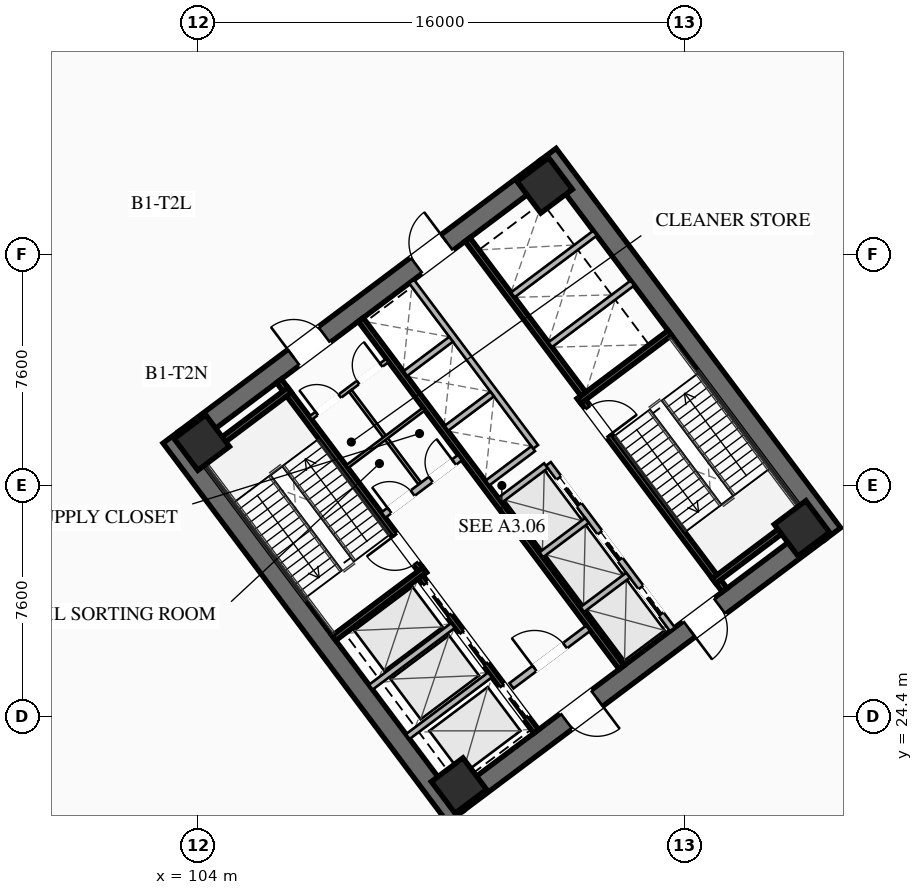
"""IFC4 building model, lengths in metres.
Left out: names, types, materials, properties, quantities, classifications, styles, units other than length and angle.
Written with IfcOpenShell. Run it as: python <this file> out.ifc"""

import sys

from ifc_helpers import new_model, si_unit, direction, frame, frame_2d, origin, origin_2d, place, context, subcontext, project, spatial, rectangle, hollow_rectangle, extrude, element, fill, save


model = new_model("IFC4")
c1 = context("Model", 3, precision=1e-05, world=origin(), true_north=direction((0.0, 1.0)))
c2 = subcontext(c1, "Body", "Model", "MODEL_VIEW")
j1 = project(units=[si_unit("LENGTHUNIT", "METRE"), si_unit("PLANEANGLEUNIT", "RADIAN")], contexts=[c1])
p1 = place(None, origin())
s1 = spatial("IfcSite", under=j1, at=p1, CompositionType="ELEMENT")
p2 = place(p1, origin())
s2 = spatial("IfcBuilding", under=s1, at=p2, CompositionType="ELEMENT")
p3 = place(p2, frame((0.0, 0.0, -5.5)))
s3 = spatial("IfcBuildingStorey", under=s2, at=p3, CompositionType="ELEMENT", Elevation=-5.5)
for number, where, z_axis, x_axis in (
    (1, (112.476, 21.107, 0.0), (0.0, 0.0, 1.0), (-0.6, 0.8, 0.0)),
    (2, (115.524, 42.893, 0.0), (0.0, 0.0, 1.0), (0.6, -0.8, 0.0)),
):
    element("IfcWall", number, at=place(p3, frame(where, z_axis=z_axis, x_axis=x_axis)), inside=s3, PredefinedType="SHEAR", context=c2, shape_type="SweptSolid", body=[
        extrude(rectangle(XDim=15.6, YDim=0.65, at=frame_2d((7.8, 0.0))), origin(), (0.0, 0.0, 1.0), 5.5),
    ])
p4 = place(p3, frame((124.429, 30.478, 0.0), z_axis=(0.0, 0.0, 1.0), x_axis=(-0.799998028465, -0.600002628705, 0.0)))
e3 = element("IfcWall", 3, at=p4, inside=s3, PredefinedType="SHEAR", context=c2, shape_type="SweptSolid", body=[
    extrude(rectangle(XDim=14.86, YDim=0.65, at=frame_2d((7.43, 0.0))), origin(), (0.0, 0.0, 1.0), 5.5),
])
p5 = place(p4, frame((9.13, 0.0, 0.0)))
e4 = element("IfcOpeningElement", 4, at=p5, cuts=e3, PredefinedType="OPENING", context=c2, shape_type="SweptSolid", body=[
    extrude(rectangle(XDim=1.25, YDim=2.25, at=frame_2d((0.625, 1.125))), frame((0.0, 0.335, 0.0), z_axis=(0.0, -1.0, 0.0), x_axis=(1.0, 0.0, 0.0)), (0.0, 0.0, 1.0), 0.67),
])
p6 = place(p4, frame((4.08, 0.0, 0.0)))
e5 = element("IfcOpeningElement", 5, at=p6, cuts=e3, PredefinedType="OPENING", context=c2, shape_type="SweptSolid", body=[
    extrude(rectangle(XDim=1.25, YDim=2.25, at=frame_2d((0.625, 1.125))), frame((0.0, 0.335, 0.0), z_axis=(0.0, -1.0, 0.0), x_axis=(1.0, 0.0, 0.0)), (0.0, 0.0, 1.0), 0.67),
])
p7 = place(p3, frame((103.571, 33.522, 0.0), z_axis=(0.0, 0.0, 1.0), x_axis=(0.799998028465, 0.600002628705, 0.0)))
e6 = element("IfcWall", 6, at=p7, inside=s3, PredefinedType="SHEAR", context=c2, shape_type="SweptSolid", body=[
    extrude(rectangle(XDim=14.86, YDim=0.65, at=frame_2d((7.43, 0.0))), origin(), (0.0, 0.0, 1.0), 5.5),
])
p8 = place(p7, frame((4.48, 0.0, 0.0)))
e7 = element("IfcOpeningElement", 7, at=p8, cuts=e6, PredefinedType="OPENING", context=c2, shape_type="SweptSolid", body=[
    extrude(rectangle(XDim=1.25, YDim=2.25, at=frame_2d((0.625, 1.125))), frame((0.0, 0.335, 0.0), z_axis=(0.0, -1.0, 0.0), x_axis=(1.0, 0.0, 0.0)), (0.0, 0.0, 1.0), 0.67),
])
p9 = place(p7, frame((9.53, 0.0, 0.0)))
e8 = element("IfcOpeningElement", 8, at=p9, cuts=e6, PredefinedType="OPENING", context=c2, shape_type="SweptSolid", body=[
    extrude(rectangle(XDim=1.25, YDim=2.25, at=frame_2d((0.625, 1.125))), frame((0.0, 0.335, 0.0), z_axis=(0.0, -1.0, 0.0), x_axis=(1.0, 0.0, 0.0)), (0.0, 0.0, 1.0), 0.67),
])
for number, where, z_axis, x_axis in (
    (9, (112.59, 22.13, 0.0), (0.0, 0.0, 1.0), (0.8, 0.6, 0.0)),
    (10, (123.87, 30.59, 0.0), (0.0, 0.0, 1.0), (0.8, 0.6, 0.0)),
    (11, (115.41, 41.87, 0.0), (0.0, 0.0, 1.0), (0.8, 0.6, 0.0)),
    (12, (104.13, 33.41, 0.0), (0.0, 0.0, 1.0), (0.8, 0.6, 0.0)),
):
    element("IfcColumn", number, at=place(p3, frame(where, z_axis=z_axis, x_axis=x_axis)), inside=s3, PredefinedType="COLUMN", context=c2, shape_type="SweptSolid", body=[
        extrude(hollow_rectangle(XDim=1.3, YDim=1.3, WallThickness=0.05, at=origin_2d()), origin(), (0.0, 0.0, 1.0), 5.2),
    ])
p10 = place(p3, frame((111.44, 29.08, 0.0), z_axis=(0.0, 0.0, 1.0), x_axis=(-0.600009827119, 0.799992629566, 0.0)))
e13 = element("IfcWall", 13, at=p10, inside=s3, PredefinedType="SHEAR", context=c2, shape_type="SweptSolid", body=[
    extrude(rectangle(XDim=7.95, YDim=0.2, at=frame_2d((3.975, 0.0))), origin(), (0.0, 0.0, 1.0), 5.2),
])
p11 = place(p10, frame((0.45, 0.0, 0.0)))
e14 = element("IfcOpeningElement", 14, at=p11, cuts=e13, PredefinedType="OPENING", context=c2, shape_type="SweptSolid", body=[
    extrude(rectangle(XDim=1.15, YDim=2.2, at=frame_2d((0.575, 1.1))), frame((0.0, 0.11, 0.0), z_axis=(0.0, -1.0, 0.0), x_axis=(1.0, 0.0, 0.0)), (0.0, 0.0, 1.0), 0.22),
])
for number, where, z_axis, x_axis in (
    (15, (108.476, 26.982, 0.0), (0.0, 0.0, 1.0), (0.8, 0.6, 0.0)),
    (16, (104.036, 32.902, 0.0), (0.0, 0.0, 1.0), (0.8, 0.6, 0.0)),
):
    element("IfcWall", number, at=place(p3, frame(where, z_axis=z_axis, x_axis=x_axis)), inside=s3, PredefinedType="SHEAR", context=c2, shape_type="SweptSolid", body=[
        extrude(rectangle(XDim=3.73, YDim=0.2, at=frame_2d((1.865, 0.0))), origin(), (0.0, 0.0, 1.0), 5.2),
    ])
p12 = place(p3, frame((116.56, 34.92, 0.0), z_axis=(0.0, 0.0, 1.0), x_axis=(0.600009827119, -0.799992629566, 0.0)))
e17 = element("IfcWall", 17, at=p12, inside=s3, PredefinedType="SHEAR", context=c2, shape_type="SweptSolid", body=[
    extrude(rectangle(XDim=7.95, YDim=0.2, at=frame_2d((3.975, 0.0))), origin(), (0.0, 0.0, 1.0), 5.2),
])
p13 = place(p12, frame((0.45, 0.0, 0.0)))
e18 = element("IfcOpeningElement", 18, at=p13, cuts=e17, PredefinedType="OPENING", context=c2, shape_type="SweptSolid", body=[
    extrude(rectangle(XDim=1.15, YDim=2.2, at=frame_2d((0.575, 1.1))), frame((0.0, 0.11, 0.0), z_axis=(0.0, -1.0, 0.0), x_axis=(1.0, 0.0, 0.0)), (0.0, 0.0, 1.0), 0.22),
])
for number, where, z_axis, x_axis in (
    (19, (116.54, 34.78, 0.0), (0.0, 0.0, 1.0), (0.8, 0.6, 0.0)),
    (20, (120.98, 28.86, 0.0), (0.0, 0.0, 1.0), (0.8, 0.6, 0.0)),
):
    element("IfcWall", number, at=place(p3, frame(where, z_axis=z_axis, x_axis=x_axis)), inside=s3, PredefinedType="SHEAR", context=c2, shape_type="SweptSolid", body=[
        extrude(rectangle(XDim=3.73, YDim=0.2, at=frame_2d((1.865, 0.0))), origin(), (0.0, 0.0, 1.0), 5.2),
    ])
p14 = place(p3, frame((117.938, 26.016, 0.0), z_axis=(0.0, 0.0, 1.0), x_axis=(-0.600005463273, 0.799995902516, 0.0)))
e21 = element("IfcWall", 21, at=p14, inside=s3, PredefinedType="SHEAR", context=c2, shape_type="SweptSolid", body=[
    extrude(rectangle(XDim=14.3, YDim=0.2, at=frame_2d((7.15, 0.0))), origin(), (0.0, 0.0, 1.0), 5.2),
])
p15 = place(p3, frame((110.104, 31.028, 0.0), z_axis=(0.0, 0.0, 1.0), x_axis=(0.800018601094, 0.59997519774, 0.0)))
e22 = element("IfcWall", 22, at=p15, inside=s3, PredefinedType="SOLIDWALL", context=c2, shape_type="SweptSolid", body=[
    extrude(rectangle(XDim=3.15, YDim=0.22, at=frame_2d((1.575, 0.0))), origin(), (0.0, 0.0, 1.0), 4.243),
])
p16 = place(p15, frame((0.25, 0.0, 0.0)))
e23 = element("IfcOpeningElement", 23, at=p16, cuts=e22, PredefinedType="OPENING", context=c2, shape_type="SweptSolid", body=[
    extrude(rectangle(XDim=0.95, YDim=2.05, at=frame_2d((0.475, 1.025))), frame((0.0, 0.12, 0.0), z_axis=(0.0, -1.0, 0.0), x_axis=(1.0, 0.0, 0.0)), (0.0, 0.0, 1.0), 0.24),
])
p17 = place(p15, frame((1.95, 0.0, 0.0)))
e24 = element("IfcOpeningElement", 24, at=p17, cuts=e22, PredefinedType="OPENING", context=c2, shape_type="SweptSolid", body=[
    extrude(rectangle(XDim=0.95, YDim=2.05, at=frame_2d((0.475, 1.025))), frame((0.0, 0.12, 0.0), z_axis=(0.0, -1.0, 0.0), x_axis=(1.0, 0.0, 0.0)), (0.0, 0.0, 1.0), 0.24),
])
p18 = place(p3, frame((114.316, 25.412, 0.0), z_axis=(0.0, 0.0, 1.0), x_axis=(0.800018601094, 0.59997519774, 0.0)))
e25 = element("IfcWall", 25, at=p18, inside=s3, PredefinedType="SOLIDWALL", context=c2, shape_type="SweptSolid", body=[
    extrude(rectangle(XDim=3.15, YDim=0.22, at=frame_2d((1.575, 0.0))), origin(), (0.0, 0.0, 1.0), 4.243),
])
p19 = place(p18, frame((0.95, 0.0, 0.0)))
e26 = element("IfcOpeningElement", 26, at=p19, cuts=e25, PredefinedType="OPENING", context=c2, shape_type="SweptSolid", body=[
    extrude(rectangle(XDim=1.25, YDim=2.25, at=frame_2d((0.625, 1.125))), frame((0.0, 0.12, 0.0), z_axis=(0.0, -1.0, 0.0), x_axis=(1.0, 0.0, 0.0)), (0.0, 0.0, 1.0), 0.24),
])
p20 = place(p3, frame((115.13, 23.91, 0.0), z_axis=(0.0, 0.0, 1.0), x_axis=(-0.599975393228, 0.800018454488, 0.0)))
e27 = element("IfcWall", 27, at=p20, inside=s3, PredefinedType="SHEAR", context=c2, shape_type="SweptSolid", body=[
    extrude(rectangle(XDim=6.35, YDim=0.2, at=frame_2d((3.175, 0.0))), origin(), (0.0, 0.0, 1.0), 5.2),
])
p21 = place(p20, frame((4.775, 0.0, 0.0)))
e28 = element("IfcOpeningElement", 28, at=p21, cuts=e27, PredefinedType="OPENING", context=c2, shape_type="SweptSolid", body=[
    extrude(rectangle(XDim=1.3, YDim=2.25, at=frame_2d((0.65, 1.125))), frame((0.0, 0.11, 0.0), z_axis=(0.0, -1.0, 0.0), x_axis=(1.0, 0.0, 0.0)), (0.0, 0.0, 1.0), 0.22),
])
p22 = place(p20, frame((2.775, 0.0, 0.0)))
e29 = element("IfcOpeningElement", 29, at=p22, cuts=e27, PredefinedType="OPENING", context=c2, shape_type="SweptSolid", body=[
    extrude(rectangle(XDim=1.3, YDim=2.25, at=frame_2d((0.65, 1.125))), frame((0.0, 0.11, 0.0), z_axis=(0.0, -1.0, 0.0), x_axis=(1.0, 0.0, 0.0)), (0.0, 0.0, 1.0), 0.22),
])
p23 = place(p20, frame((0.575, 0.0, 0.0)))
e30 = element("IfcOpeningElement", 30, at=p23, cuts=e27, PredefinedType="OPENING", context=c2, shape_type="SweptSolid", body=[
    extrude(rectangle(XDim=1.3, YDim=2.25, at=frame_2d((0.65, 1.125))), frame((0.0, 0.11, 0.0), z_axis=(0.0, -1.0, 0.0), x_axis=(1.0, 0.0, 0.0)), (0.0, 0.0, 1.0), 0.22),
])
for number, where, z_axis, x_axis in (
    (31, (110.906, 23.742, 0.0), (0.0, 0.0, 1.0), (0.8, 0.6, 0.0)),
    (32, (109.688, 25.366, 0.0), (0.0, 0.0, 1.0), (0.8, 0.6, 0.0)),
):
    element("IfcWall", number, at=place(p3, frame(where, z_axis=z_axis, x_axis=x_axis)), inside=s3, PredefinedType="SOLIDWALL", context=c2, shape_type="SweptSolid", body=[
        extrude(rectangle(XDim=3.38, YDim=0.2, at=frame_2d((1.69, 0.0))), origin(), (0.0, 0.0, 1.0), 5.2),
    ])
p24 = place(p3, frame((112.87, 40.09, 0.0), z_axis=(0.0, 0.0, 1.0), x_axis=(0.599975393228, -0.800018454488, 0.0)))
e33 = element("IfcWall", 33, at=p24, inside=s3, PredefinedType="SHEAR", context=c2, shape_type="SweptSolid", body=[
    extrude(rectangle(XDim=6.35, YDim=0.2, at=frame_2d((3.175, 0.0))), origin(), (0.0, 0.0, 1.0), 5.2),
])
for number, where, z_axis, x_axis in (
    (34, (115.59, 36.63, 0.0), (0.0, 0.0, 1.0), (0.8, 0.6, 0.0)),
    (35, (114.36, 38.27, 0.0), (0.0, 0.0, 1.0), (0.8, 0.6, 0.0)),
):
    element("IfcWall", number, at=place(p3, frame(where, z_axis=z_axis, x_axis=x_axis)), inside=s3, PredefinedType="SOLIDWALL", context=c2, shape_type="SweptSolid", body=[
        extrude(rectangle(XDim=3.38, YDim=0.2, at=frame_2d((1.69, 0.0))), origin(), (0.0, 0.0, 1.0), 5.2),
    ])
p25 = place(p3, frame((107.71, 34.22, 0.0), z_axis=(0.0, 0.0, 1.0), x_axis=(0.799981399002, 0.60002480053, 0.0)))
e36 = element("IfcWall", 36, at=p25, inside=s3, PredefinedType="PARTITIONING", context=c2, shape_type="SweptSolid", body=[
    extrude(rectangle(XDim=3.15, YDim=0.135, at=frame_2d((1.575, 0.0))), origin(), (0.0, 0.0, 1.0), 4.243),
])
p26 = place(p25, frame((0.25, 0.0, 0.0)))
e37 = element("IfcOpeningElement", 37, at=p26, cuts=e36, PredefinedType="OPENING", context=c2, shape_type="SweptSolid", body=[
    extrude(rectangle(XDim=0.95, YDim=2.05, at=frame_2d((0.475, 1.025))), frame((0.0, 0.077, 0.0), z_axis=(0.0, -1.0, 0.0), x_axis=(1.0, 0.0, 0.0)), (0.0, 0.0, 1.0), 0.155),
])
p27 = place(p25, frame((1.95, 0.0, 0.0)))
e38 = element("IfcOpeningElement", 38, at=p27, cuts=e36, PredefinedType="OPENING", context=c2, shape_type="SweptSolid", body=[
    extrude(rectangle(XDim=0.95, YDim=2.05, at=frame_2d((0.475, 1.025))), frame((0.0, 0.077, 0.0), z_axis=(0.0, -1.0, 0.0), x_axis=(1.0, 0.0, 0.0)), (0.0, 0.0, 1.0), 0.155),
])
p28 = place(p3, frame((111.296, 32.072, 0.0), z_axis=(0.0, 0.0, 1.0), x_axis=(-0.59995887973, 0.800030838552, 0.0)))
e39 = element("IfcWall", 39, at=p28, inside=s3, PredefinedType="PARTITIONING", context=c2, shape_type="SweptSolid", body=[
    extrude(rectangle(XDim=3.8, YDim=0.11, at=frame_2d((1.9, 0.0))), origin(), (0.0, 0.0, 1.0), 4.243),
])
p29 = place(p3, frame((108.91, 32.62, 0.0), z_axis=(0.0, 0.0, 1.0), x_axis=(0.800018601094, 0.59997519774, 0.0)))
e40 = element("IfcWall", 40, at=p29, inside=s3, PredefinedType="PARTITIONING", context=c2, shape_type="SweptSolid", body=[
    extrude(rectangle(XDim=3.15, YDim=0.11, at=frame_2d((1.575, 0.0))), origin(), (0.0, 0.0, 1.0), 4.243),
])
p30 = place(p3, frame((119.61, 27.27, 0.0), z_axis=(0.0, 0.0, 1.0), x_axis=(-0.600011488909, 0.79999138319, 0.0)))
e41 = element("IfcWall", 41, at=p30, inside=s3, PredefinedType="SOLIDWALL", context=c2, shape_type="SweptSolid", body=[
    extrude(rectangle(XDim=6.8, YDim=0.2, at=frame_2d((3.4, 0.0))), origin(), (0.0, 0.0, 1.0), 5.2),
])
p31 = place(p30, frame((0.625, 0.0, 0.0)))
e42 = element("IfcOpeningElement", 42, at=p31, cuts=e41, PredefinedType="OPENING", context=c2, shape_type="SweptSolid", body=[
    extrude(rectangle(XDim=1.1, YDim=2.2, at=frame_2d((0.55, 1.1))), frame((0.0, 0.11, 0.0), z_axis=(0.0, -1.0, 0.0), x_axis=(1.0, 0.0, 0.0)), (0.0, 0.0, 1.0), 0.22),
])
p32 = place(p30, frame((2.875, 0.0, 0.0)))
e43 = element("IfcOpeningElement", 43, at=p32, cuts=e41, PredefinedType="OPENING", context=c2, shape_type="SweptSolid", body=[
    extrude(rectangle(XDim=1.1, YDim=2.2, at=frame_2d((0.55, 1.1))), frame((0.0, 0.11, 0.0), z_axis=(0.0, -1.0, 0.0), x_axis=(1.0, 0.0, 0.0)), (0.0, 0.0, 1.0), 0.22),
])
p33 = place(p30, frame((5.125, 0.0, 0.0)))
e44 = element("IfcOpeningElement", 44, at=p33, cuts=e41, PredefinedType="OPENING", context=c2, shape_type="SweptSolid", body=[
    extrude(rectangle(XDim=1.1, YDim=2.2, at=frame_2d((0.55, 1.1))), frame((0.0, 0.11, 0.0), z_axis=(0.0, -1.0, 0.0), x_axis=(1.0, 0.0, 0.0)), (0.0, 0.0, 1.0), 0.22),
])
p34 = place(p3, frame((116.646, 27.922, 0.0), z_axis=(0.0, 0.0, 1.0), x_axis=(0.8, 0.6, 0.0)))
e45 = element("IfcWall", 45, at=p34, inside=s3, PredefinedType="SOLIDWALL", context=c2, shape_type="SweptSolid", body=[
    extrude(rectangle(XDim=1.88, YDim=0.2, at=frame_2d((0.94, 0.0))), origin(), (0.0, 0.0, 1.0), 5.2),
])
p35 = place(p3, frame((115.296, 29.722, 0.0), z_axis=(0.0, 0.0, 1.0), x_axis=(0.799984418148, 0.600020775241, 0.0)))
e46 = element("IfcWall", 46, at=p35, inside=s3, PredefinedType="SOLIDWALL", context=c2, shape_type="SweptSolid", body=[
    extrude(rectangle(XDim=1.88, YDim=0.2, at=frame_2d((0.94, 0.0))), origin(), (0.0, 0.0, 1.0), 5.2),
])
p36 = place(p3, frame((113.946, 31.522, 0.0), z_axis=(0.0, 0.0, 1.0), x_axis=(0.8, 0.6, 0.0)))
e47 = element("IfcWall", 47, at=p36, inside=s3, PredefinedType="SOLIDWALL", context=c2, shape_type="SweptSolid", body=[
    extrude(rectangle(XDim=1.88, YDim=0.2, at=frame_2d((0.94, 0.0))), origin(), (0.0, 0.0, 1.0), 5.2),
])
p37 = place(p3, frame((115.11, 33.27, 0.0), z_axis=(0.0, 0.0, 1.0), x_axis=(-0.600011488909, 0.79999138319, 0.0)))
e48 = element("IfcWall", 48, at=p37, inside=s3, PredefinedType="SOLIDWALL", context=c2, shape_type="SweptSolid", body=[
    extrude(rectangle(XDim=6.8, YDim=0.2, at=frame_2d((3.4, 0.0))), origin(), (0.0, 0.0, 1.0), 5.2),
])
p38 = place(p3, frame((113.526, 32.082, 0.0), z_axis=(0.0, 0.0, 1.0), x_axis=(0.800046745961, 0.599937666993, 0.0)))
e49 = element("IfcWall", 49, at=p38, inside=s3, PredefinedType="SOLIDWALL", context=c2, shape_type="SweptSolid", body=[
    extrude(rectangle(XDim=1.88, YDim=0.2, at=frame_2d((0.94, 0.0))), origin(), (0.0, 0.0, 1.0), 5.2),
])
p39 = place(p3, frame((112.176, 33.882, 0.0), z_axis=(0.0, 0.0, 1.0), x_axis=(0.8, 0.6, 0.0)))
e50 = element("IfcWall", 50, at=p39, inside=s3, PredefinedType="SOLIDWALL", context=c2, shape_type="SweptSolid", body=[
    extrude(rectangle(XDim=1.88, YDim=0.2, at=frame_2d((0.94, 0.0))), origin(), (0.0, 0.0, 1.0), 5.2),
])
p40 = place(p3, frame((110.826, 35.682, 0.0), z_axis=(0.0, 0.0, 1.0), x_axis=(0.799984418148, 0.600020775241, 0.0)))
e51 = element("IfcWall", 51, at=p40, inside=s3, PredefinedType="SOLIDWALL", context=c2, shape_type="SweptSolid", body=[
    extrude(rectangle(XDim=1.88, YDim=0.2, at=frame_2d((0.94, 0.0))), origin(), (0.0, 0.0, 1.0), 5.2),
])
p41 = place(p8, origin())
e52 = element("IfcDoor", 52, at=p41, inside=s3, OperationType="SINGLE_SWING_LEFT", PredefinedType="DOOR", context=c2, shape_type="SweptSolid", body=[
    extrude(rectangle(XDim=1.25, YDim=2.25, at=frame_2d((0.625, 1.125))), frame((0.0, 0.025, 0.0), z_axis=(0.0, -1.0, 0.0), x_axis=(1.0, 0.0, 0.0)), (0.0, 0.0, 1.0), 0.05),
])
fill(e7, e52)
p42 = place(p9, origin())
e53 = element("IfcDoor", 53, at=p42, inside=s3, OperationType="SINGLE_SWING_RIGHT", PredefinedType="DOOR", context=c2, shape_type="SweptSolid", body=[
    extrude(rectangle(XDim=1.25, YDim=2.25, at=frame_2d((0.625, 1.125))), frame((0.0, 0.025, 0.0), z_axis=(0.0, -1.0, 0.0), x_axis=(1.0, 0.0, 0.0)), (0.0, 0.0, 1.0), 0.05),
])
fill(e8, e53)
p43 = place(p5, origin())
e54 = element("IfcDoor", 54, at=p43, inside=s3, OperationType="SINGLE_SWING_LEFT", PredefinedType="DOOR", context=c2, shape_type="SweptSolid", body=[
    extrude(rectangle(XDim=1.25, YDim=2.25, at=frame_2d((0.625, 1.125))), frame((0.0, 0.025, 0.0), z_axis=(0.0, -1.0, 0.0), x_axis=(1.0, 0.0, 0.0)), (0.0, 0.0, 1.0), 0.05),
])
fill(e4, e54)
p44 = place(p6, origin())
e55 = element("IfcDoor", 55, at=p44, inside=s3, OperationType="SINGLE_SWING_RIGHT", PredefinedType="DOOR", context=c2, shape_type="SweptSolid", body=[
    extrude(rectangle(XDim=1.25, YDim=2.25, at=frame_2d((0.625, 1.125))), frame((0.0, 0.025, 0.0), z_axis=(0.0, -1.0, 0.0), x_axis=(1.0, 0.0, 0.0)), (0.0, 0.0, 1.0), 0.05),
])
fill(e5, e55)
p45 = place(p11, origin())
e56 = element("IfcDoor", 56, at=p45, inside=s3, OperationType="SINGLE_SWING_RIGHT", PredefinedType="DOOR", context=c2, shape_type="SweptSolid", body=[
    extrude(rectangle(XDim=1.15, YDim=2.2, at=frame_2d((0.575, 1.1))), frame((0.0, 0.025, 0.0), z_axis=(0.0, -1.0, 0.0), x_axis=(1.0, 0.0, 0.0)), (0.0, 0.0, 1.0), 0.05),
])
fill(e14, e56)
p46 = place(p13, origin())
e57 = element("IfcDoor", 57, at=p46, inside=s3, OperationType="SINGLE_SWING_RIGHT", PredefinedType="DOOR", context=c2, shape_type="SweptSolid", body=[
    extrude(rectangle(XDim=1.15, YDim=2.2, at=frame_2d((0.575, 1.1))), frame((0.0, 0.025, 0.0), z_axis=(0.0, -1.0, 0.0), x_axis=(1.0, 0.0, 0.0)), (0.0, 0.0, 1.0), 0.05),
])
fill(e18, e57)
p47 = place(p19, origin())
e58 = element("IfcDoor", 58, at=p47, inside=s3, OperationType="SINGLE_SWING_LEFT", PredefinedType="DOOR", context=c2, shape_type="SweptSolid", body=[
    extrude(rectangle(XDim=1.25, YDim=2.25, at=frame_2d((0.625, 1.125))), frame((0.0, 0.025, 0.0), z_axis=(0.0, -1.0, 0.0), x_axis=(1.0, 0.0, 0.0)), (0.0, 0.0, 1.0), 0.05),
])
fill(e26, e58)
p48 = place(p26, origin())
e59 = element("IfcDoor", 59, at=p48, inside=s3, OperationType="SINGLE_SWING_LEFT", PredefinedType="DOOR", context=c2, shape_type="SweptSolid", body=[
    extrude(rectangle(XDim=0.95, YDim=2.05, at=frame_2d((0.475, 1.025))), frame((0.0, 0.025, 0.0), z_axis=(0.0, -1.0, 0.0), x_axis=(1.0, 0.0, 0.0)), (0.0, 0.0, 1.0), 0.05),
])
fill(e37, e59)
p49 = place(p27, origin())
e60 = element("IfcDoor", 60, at=p49, inside=s3, OperationType="SINGLE_SWING_RIGHT", PredefinedType="DOOR", context=c2, shape_type="SweptSolid", body=[
    extrude(rectangle(XDim=0.95, YDim=2.05, at=frame_2d((0.475, 1.025))), frame((0.0, 0.025, 0.0), z_axis=(0.0, -1.0, 0.0), x_axis=(1.0, 0.0, 0.0)), (0.0, 0.0, 1.0), 0.05),
])
fill(e38, e60)
p50 = place(p16, origin())
e61 = element("IfcDoor", 61, at=p50, inside=s3, OperationType="SINGLE_SWING_LEFT", PredefinedType="DOOR", context=c2, shape_type="SweptSolid", body=[
    extrude(rectangle(XDim=0.95, YDim=2.05, at=frame_2d((0.475, 1.025))), frame((0.0, 0.025, 0.0), z_axis=(0.0, -1.0, 0.0), x_axis=(1.0, 0.0, 0.0)), (0.0, 0.0, 1.0), 0.05),
])
fill(e23, e61)
p51 = place(p17, origin())
e62 = element("IfcDoor", 62, at=p51, inside=s3, OperationType="SINGLE_SWING_RIGHT", PredefinedType="DOOR", context=c2, shape_type="SweptSolid", body=[
    extrude(rectangle(XDim=0.95, YDim=2.05, at=frame_2d((0.475, 1.025))), frame((0.0, 0.025, 0.0), z_axis=(0.0, -1.0, 0.0), x_axis=(1.0, 0.0, 0.0)), (0.0, 0.0, 1.0), 0.05),
])
fill(e24, e62)
p52 = place(p21, origin())
e63 = element("IfcDoor", 63, at=p52, inside=s3, OperationType="SLIDING_TO_LEFT", PredefinedType="DOOR", context=c2, shape_type="SweptSolid", body=[
    extrude(rectangle(XDim=1.3, YDim=2.25, at=frame_2d((0.65, 1.125))), frame((0.0, 0.025, 0.0), z_axis=(0.0, -1.0, 0.0), x_axis=(1.0, 0.0, 0.0)), (0.0, 0.0, 1.0), 0.05),
])
fill(e28, e63)
p53 = place(p22, origin())
e64 = element("IfcDoor", 64, at=p53, inside=s3, OperationType="SLIDING_TO_LEFT", PredefinedType="DOOR", context=c2, shape_type="SweptSolid", body=[
    extrude(rectangle(XDim=1.3, YDim=2.25, at=frame_2d((0.65, 1.125))), frame((0.0, 0.025, 0.0), z_axis=(0.0, -1.0, 0.0), x_axis=(1.0, 0.0, 0.0)), (0.0, 0.0, 1.0), 0.05),
])
fill(e29, e64)
p54 = place(p23, origin())
e65 = element("IfcDoor", 65, at=p54, inside=s3, OperationType="SLIDING_TO_LEFT", PredefinedType="DOOR", context=c2, shape_type="SweptSolid", body=[
    extrude(rectangle(XDim=1.3, YDim=2.25, at=frame_2d((0.65, 1.125))), frame((0.0, 0.025, 0.0), z_axis=(0.0, -1.0, 0.0), x_axis=(1.0, 0.0, 0.0)), (0.0, 0.0, 1.0), 0.05),
])
fill(e30, e65)
p55 = place(p31, origin())
e66 = element("IfcDoor", 66, at=p55, inside=s3, OperationType="SLIDING_TO_LEFT", PredefinedType="DOOR", context=c2, shape_type="SweptSolid", body=[
    extrude(rectangle(XDim=1.1, YDim=2.2, at=frame_2d((0.55, 1.1))), frame((0.0, 0.025, 0.0), z_axis=(0.0, -1.0, 0.0), x_axis=(1.0, 0.0, 0.0)), (0.0, 0.0, 1.0), 0.05),
])
fill(e42, e66)
p56 = place(p32, origin())
e67 = element("IfcDoor", 67, at=p56, inside=s3, OperationType="SLIDING_TO_LEFT", PredefinedType="DOOR", context=c2, shape_type="SweptSolid", body=[
    extrude(rectangle(XDim=1.1, YDim=2.2, at=frame_2d((0.55, 1.1))), frame((0.0, 0.025, 0.0), z_axis=(0.0, -1.0, 0.0), x_axis=(1.0, 0.0, 0.0)), (0.0, 0.0, 1.0), 0.05),
])
fill(e43, e67)
p57 = place(p33, origin())
e68 = element("IfcDoor", 68, at=p57, inside=s3, OperationType="SLIDING_TO_LEFT", PredefinedType="DOOR", context=c2, shape_type="SweptSolid", body=[
    extrude(rectangle(XDim=1.1, YDim=2.2, at=frame_2d((0.55, 1.1))), frame((0.0, 0.025, 0.0), z_axis=(0.0, -1.0, 0.0), x_axis=(1.0, 0.0, 0.0)), (0.0, 0.0, 1.0), 0.05),
])
fill(e44, e68)
save(model, sys.argv[1])
